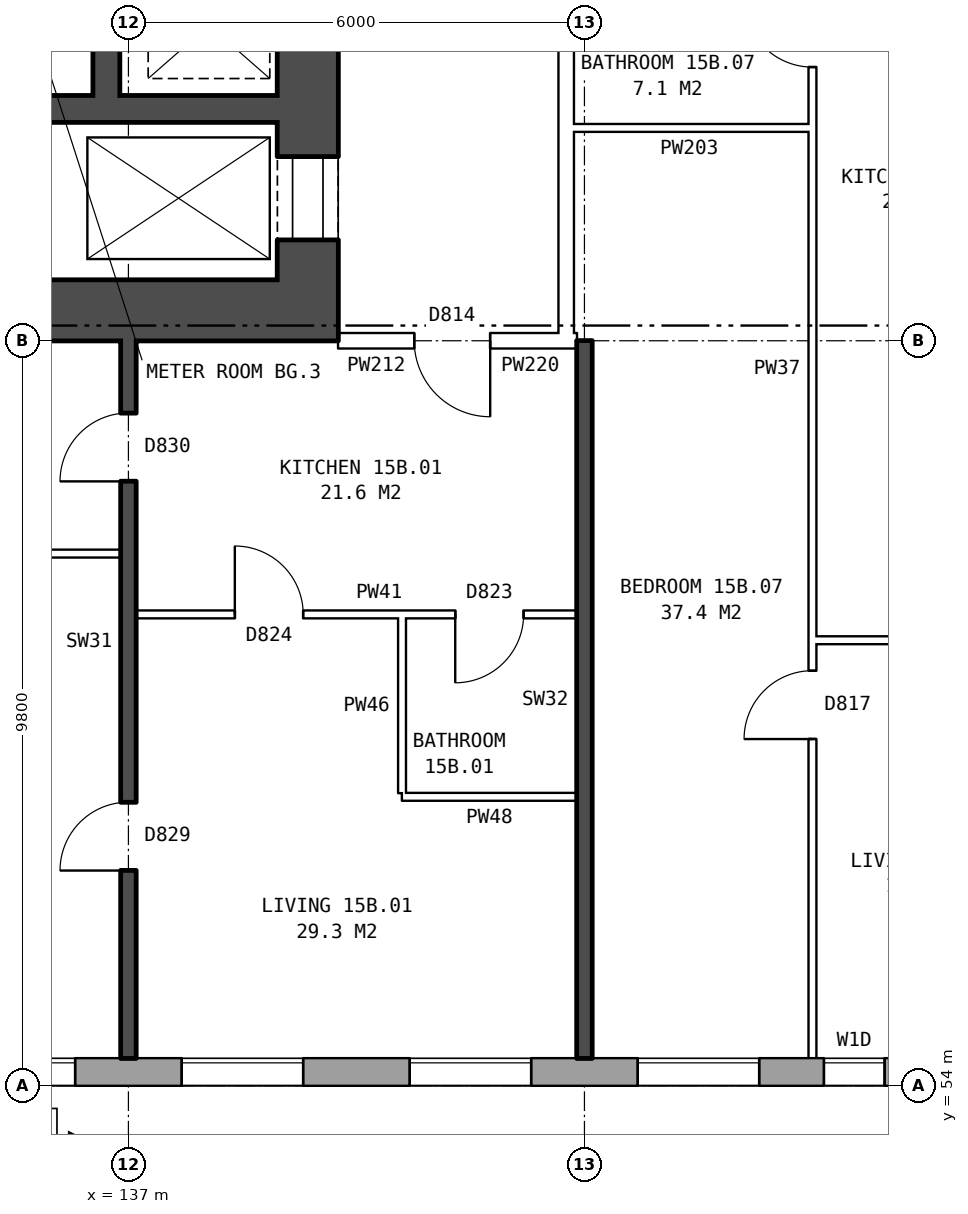
"""IFC4 building model, lengths in metres.
Left out: names, types, materials, properties, quantities, classifications, styles, units other than length and angle.
Written with IfcOpenShell. Run it as: python <this file> out.ifc"""

import sys

from ifc_helpers import new_model, si_unit, direction, frame, frame_2d, origin, place, context, subcontext, project, spatial, rectangle, extrude, element, fill, save


model = new_model("IFC4")
c1 = context("Model", 3, precision=1e-05, world=origin(), true_north=direction((0.0, 1.0)))
c2 = subcontext(c1, "Body", "Model", "MODEL_VIEW")
j1 = project(units=[si_unit("LENGTHUNIT", "METRE"), si_unit("PLANEANGLEUNIT", "RADIAN")], contexts=[c1])
p1 = place(None, origin())
s1 = spatial("IfcSite", under=j1, at=p1, CompositionType="ELEMENT")
p2 = place(p1, origin())
s2 = spatial("IfcBuilding", under=s1, at=p2, CompositionType="ELEMENT")
p3 = place(p2, frame((0.0, 0.0, 56.7)))
s3 = spatial("IfcBuildingStorey", under=s2, at=p3, CompositionType="ELEMENT", Elevation=56.7)
p4 = place(p3, frame((134.075, 54.18, 0.0), z_axis=(0.0, 0.0, 1.0), x_axis=(1.0, 0.0, 0.0)))
e1 = element("IfcWall", 1, at=p4, inside=s3, PredefinedType="STANDARD", context=c2, shape_type="SweptSolid", body=[
    extrude(rectangle(XDim=39.351, YDim=0.36, at=frame_2d((19.675, 0.0))), origin(), (0.0, 0.0, 1.0), 2.85),
])
p5 = place(p4, frame((0.625, 0.0, 0.8)))
e2 = element("IfcOpeningElement", 2, at=p5, cuts=e1, PredefinedType="OPENING", context=c2, shape_type="SweptSolid", body=[
    extrude(rectangle(XDim=1.6, YDim=1.8, at=frame_2d((0.8, 0.9))), frame((0.0, 0.19, 0.0), z_axis=(0.0, -1.0, 0.0), x_axis=(1.0, 0.0, 0.0)), (0.0, 0.0, 1.0), 0.38),
])
p6 = place(p4, frame((3.625, 0.0, 0.8)))
e3 = element("IfcOpeningElement", 3, at=p6, cuts=e1, PredefinedType="OPENING", context=c2, shape_type="SweptSolid", body=[
    extrude(rectangle(XDim=1.6, YDim=1.8, at=frame_2d((0.8, 0.9))), frame((0.0, 0.19, 0.0), z_axis=(0.0, -1.0, 0.0), x_axis=(1.0, 0.0, 0.0)), (0.0, 0.0, 1.0), 0.38),
])
p7 = place(p4, frame((6.625, 0.0, 0.8)))
e4 = element("IfcOpeningElement", 4, at=p7, cuts=e1, PredefinedType="OPENING", context=c2, shape_type="SweptSolid", body=[
    extrude(rectangle(XDim=1.6, YDim=1.8, at=frame_2d((0.8, 0.9))), frame((0.0, 0.19, 0.0), z_axis=(0.0, -1.0, 0.0), x_axis=(1.0, 0.0, 0.0)), (0.0, 0.0, 1.0), 0.38),
])
p8 = place(p4, frame((9.625, 0.0, 0.8)))
e5 = element("IfcOpeningElement", 5, at=p8, cuts=e1, PredefinedType="OPENING", context=c2, shape_type="SweptSolid", body=[
    extrude(rectangle(XDim=1.6, YDim=1.8, at=frame_2d((0.8, 0.9))), frame((0.0, 0.19, 0.0), z_axis=(0.0, -1.0, 0.0), x_axis=(1.0, 0.0, 0.0)), (0.0, 0.0, 1.0), 0.38),
])
p9 = place(p4, frame((12.075, 0.0, 0.8)))
e6 = element("IfcOpeningElement", 6, at=p9, cuts=e1, PredefinedType="OPENING", context=c2, shape_type="SweptSolid", body=[
    extrude(rectangle(XDim=0.8, YDim=1.8, at=frame_2d((0.4, 0.9))), frame((0.0, 0.19, 0.0), z_axis=(0.0, -1.0, 0.0), x_axis=(1.0, 0.0, 0.0)), (0.0, 0.0, 1.0), 0.38),
])
p10 = place(p4, frame((15.275, 0.0, 0.8)))
e7 = element("IfcOpeningElement", 7, at=p10, cuts=e1, PredefinedType="OPENING", context=c2, shape_type="SweptSolid", body=[
    extrude(rectangle(XDim=0.8, YDim=0.9, at=frame_2d((0.4, 0.45))), frame((0.0, 0.19, 0.0), z_axis=(0.0, -1.0, 0.0), x_axis=(1.0, 0.0, 0.0)), (0.0, 0.0, 1.0), 0.38),
])
p11 = place(p4, frame((18.625, 0.0, 0.8)))
e8 = element("IfcOpeningElement", 8, at=p11, cuts=e1, PredefinedType="OPENING", context=c2, shape_type="SweptSolid", body=[
    extrude(rectangle(XDim=1.6, YDim=1.8, at=frame_2d((0.8, 0.9))), frame((0.0, 0.19, 0.0), z_axis=(0.0, -1.0, 0.0), x_axis=(1.0, 0.0, 0.0)), (0.0, 0.0, 1.0), 0.38),
])
p12 = place(p4, frame((21.625, 0.0, 0.8)))
e9 = element("IfcOpeningElement", 9, at=p12, cuts=e1, PredefinedType="OPENING", context=c2, shape_type="SweptSolid", body=[
    extrude(rectangle(XDim=1.6, YDim=1.8, at=frame_2d((0.8, 0.9))), frame((0.0, 0.19, 0.0), z_axis=(0.0, -1.0, 0.0), x_axis=(1.0, 0.0, 0.0)), (0.0, 0.0, 1.0), 0.38),
])
p13 = place(p4, frame((25.275, 0.0, 1.7)))
e10 = element("IfcOpeningElement", 10, at=p13, cuts=e1, PredefinedType="OPENING", context=c2, shape_type="SweptSolid", body=[
    extrude(rectangle(XDim=1.4, YDim=0.9, at=frame_2d((0.7, 0.45))), frame((0.0, 0.19, 0.0), z_axis=(0.0, -1.0, 0.0), x_axis=(1.0, 0.0, 0.0)), (0.0, 0.0, 1.0), 0.38),
])
p14 = place(p4, frame((27.625, 0.0, 0.8)))
e11 = element("IfcOpeningElement", 11, at=p14, cuts=e1, PredefinedType="OPENING", context=c2, shape_type="SweptSolid", body=[
    extrude(rectangle(XDim=1.6, YDim=1.8, at=frame_2d((0.8, 0.9))), frame((0.0, 0.19, 0.0), z_axis=(0.0, -1.0, 0.0), x_axis=(1.0, 0.0, 0.0)), (0.0, 0.0, 1.0), 0.38),
])
p15 = place(p4, frame((30.625, 0.0, 0.8)))
e12 = element("IfcOpeningElement", 12, at=p15, cuts=e1, PredefinedType="OPENING", context=c2, shape_type="SweptSolid", body=[
    extrude(rectangle(XDim=1.6, YDim=1.8, at=frame_2d((0.8, 0.9))), frame((0.0, 0.19, 0.0), z_axis=(0.0, -1.0, 0.0), x_axis=(1.0, 0.0, 0.0)), (0.0, 0.0, 1.0), 0.38),
])
p16 = place(p4, frame((33.625, 0.0, 0.8)))
e13 = element("IfcOpeningElement", 13, at=p16, cuts=e1, PredefinedType="OPENING", context=c2, shape_type="SweptSolid", body=[
    extrude(rectangle(XDim=1.6, YDim=1.8, at=frame_2d((0.8, 0.9))), frame((0.0, 0.19, 0.0), z_axis=(0.0, -1.0, 0.0), x_axis=(1.0, 0.0, 0.0)), (0.0, 0.0, 1.0), 0.38),
])
p17 = place(p4, frame((36.625, 0.0, 0.8)))
e14 = element("IfcOpeningElement", 14, at=p17, cuts=e1, PredefinedType="OPENING", context=c2, shape_type="SweptSolid", body=[
    extrude(rectangle(XDim=1.6, YDim=1.8, at=frame_2d((0.8, 0.9))), frame((0.0, 0.19, 0.0), z_axis=(0.0, -1.0, 0.0), x_axis=(1.0, 0.0, 0.0)), (0.0, 0.0, 1.0), 0.38),
])
p18 = place(p4, frame((13.175, 0.0, 1.7)))
e15 = element("IfcOpeningElement", 15, at=p18, cuts=e1, PredefinedType="OPENING", context=c2, shape_type="SweptSolid", body=[
    extrude(rectangle(XDim=0.8, YDim=0.9, at=frame_2d((0.4, 0.45))), frame((0.0, 0.19, 0.0), z_axis=(0.0, -1.0, 0.0), x_axis=(1.0, 0.0, 0.0)), (0.0, 0.0, 1.0), 0.38),
])
p19 = place(p4, frame((16.375, 0.0, 0.8)))
e16 = element("IfcOpeningElement", 16, at=p19, cuts=e1, PredefinedType="OPENING", context=c2, shape_type="SweptSolid", body=[
    extrude(rectangle(XDim=1.4, YDim=1.8, at=frame_2d((0.7, 0.9))), frame((0.0, 0.19, 0.0), z_axis=(0.0, -1.0, 0.0), x_axis=(1.0, 0.0, 0.0)), (0.0, 0.0, 1.0), 0.38),
])
p20 = place(p3, frame((139.36, 64.6, 0.0), z_axis=(0.0, 0.0, 1.0), x_axis=(0.0, 1.0, 0.0)))
e17 = element("IfcWall", 17, at=p20, inside=s3, PredefinedType="SHEAR", context=c2, shape_type="SweptSolid", body=[
    extrude(rectangle(XDim=10.8, YDim=0.8, at=frame_2d((5.4, 0.0))), origin(), (0.0, 0.0, 1.0), 2.85),
])
p21 = place(p20, frame((0.525, 0.0, 0.0)))
e18 = element("IfcOpeningElement", 18, at=p21, cuts=e17, PredefinedType="OPENING", context=c2, shape_type="SweptSolid", body=[
    extrude(rectangle(XDim=1.1, YDim=2.1, at=frame_2d((0.55, 1.05))), frame((0.0, 0.41, 0.0), z_axis=(0.0, -1.0, 0.0), x_axis=(1.0, 0.0, 0.0)), (0.0, 0.0, 1.0), 0.82),
])
p22 = place(p20, frame((9.1, 0.0, 0.0)))
e19 = element("IfcOpeningElement", 19, at=p22, cuts=e17, PredefinedType="OPENING", context=c2, shape_type="SweptSolid", body=[
    extrude(rectangle(XDim=1.1, YDim=2.1, at=frame_2d((0.55, 1.05))), frame((0.0, 0.41, 0.0), z_axis=(0.0, -1.0, 0.0), x_axis=(1.0, 0.0, 0.0)), (0.0, 0.0, 1.0), 0.82),
])
p23 = place(p20, frame((7.325, 0.0, 0.0)))
e20 = element("IfcOpeningElement", 20, at=p23, cuts=e17, PredefinedType="OPENING", context=c2, shape_type="SweptSolid", body=[
    extrude(rectangle(XDim=0.85, YDim=2.1, at=frame_2d((0.425, 1.05))), frame((0.0, 0.41, 0.0), z_axis=(0.0, -1.0, 0.0), x_axis=(1.0, 0.0, 0.0)), (0.0, 0.0, 1.0), 0.82),
])
p24 = place(p3, frame((139.76, 64.2, 0.0), z_axis=(0.0, 0.0, 1.0), x_axis=(-1.0, 0.0, 0.0)))
e21 = element("IfcWall", 21, at=p24, inside=s3, PredefinedType="SHEAR", context=c2, shape_type="SweptSolid", body=[
    extrude(rectangle(XDim=8.4, YDim=0.8, at=frame_2d((4.2, 0.0))), origin(), (0.0, 0.0, 1.0), 2.85),
])
p25 = place(p3, frame((138.96, 66.85, 0.0), z_axis=(0.0, 0.0, 1.0), x_axis=(-1.0, 0.0, 0.0)))
e22 = element("IfcWall", 22, at=p25, inside=s3, PredefinedType="SHEAR", context=c2, shape_type="SweptSolid", body=[
    extrude(rectangle(XDim=3.925, YDim=0.35, at=frame_2d((1.962, 0.0))), origin(), (0.0, 0.0, 1.0), 2.85),
])
p26 = place(p3, frame((136.71, 67.025, 0.0), z_axis=(0.0, 0.0, 1.0), x_axis=(0.0, 1.0, 0.0)))
e23 = element("IfcWall", 23, at=p26, inside=s3, PredefinedType="SHEAR", context=c2, shape_type="SweptSolid", body=[
    extrude(rectangle(XDim=4.05, YDim=0.35, at=frame_2d((2.025, 0.0))), origin(), (0.0, 0.0, 1.0), 2.85),
])
p27 = place(p3, frame((142.76, 63.9, 0.0), z_axis=(0.0, 0.0, 1.0), x_axis=(0.0, 1.0, 0.0)))
e24 = element("IfcWall", 24, at=p27, inside=s3, PredefinedType="PARTITIONING", context=c2, shape_type="SweptSolid", body=[
    extrude(rectangle(XDim=12.2, YDim=0.2, at=frame_2d((6.1, 0.0))), origin(), (0.0, 0.0, 1.0), 2.85),
])
p28 = place(p27, frame((5.1, 0.0, 0.0)))
e25 = element("IfcOpeningElement", 25, at=p28, cuts=e24, PredefinedType="OPENING", context=c2, shape_type="SweptSolid", body=[
    extrude(rectangle(XDim=2.0, YDim=2.1, at=frame_2d((1.0, 1.05))), frame((0.0, 0.11, 0.0), z_axis=(0.0, -1.0, 0.0), x_axis=(1.0, 0.0, 0.0)), (0.0, 0.0, 1.0), 0.22),
])
p29 = place(p3, frame((140.6, 57.8, 0.0), z_axis=(0.0, 0.0, 1.0), x_axis=(1.0, 0.0, 0.0)))
e26 = element("IfcWall", 26, at=p29, inside=s3, PredefinedType="PARTITIONING", context=c2, shape_type="SweptSolid", body=[
    extrude(rectangle(XDim=2.3, YDim=0.1, at=frame_2d((1.15, 0.0))), origin(), (0.0, 0.0, 1.0), 2.85),
])
p30 = place(p3, frame((146.0, 59.86, 0.0), z_axis=(0.0, 0.0, 1.0), x_axis=(1.0, 0.0, 0.0)))
e27 = element("IfcWall", 27, at=p30, inside=s3, PredefinedType="PARTITIONING", context=c2, shape_type="SweptSolid", body=[
    extrude(rectangle(XDim=6.0, YDim=0.1, at=frame_2d((3.0, 0.0))), origin(), (0.0, 0.0, 1.0), 2.85),
])
p31 = place(p30, frame((1.05, 0.0, 0.0)))
e28 = element("IfcOpeningElement", 28, at=p31, cuts=e27, PredefinedType="OPENING", context=c2, shape_type="SweptSolid", body=[
    extrude(rectangle(XDim=0.9, YDim=2.1, at=frame_2d((0.45, 1.05))), frame((0.0, 0.06, 0.0), z_axis=(0.0, -1.0, 0.0), x_axis=(1.0, 0.0, 0.0)), (0.0, 0.0, 1.0), 0.12),
])
p32 = place(p30, frame((4.05, 0.0, 0.0)))
e29 = element("IfcOpeningElement", 29, at=p32, cuts=e27, PredefinedType="OPENING", context=c2, shape_type="SweptSolid", body=[
    extrude(rectangle(XDim=0.9, YDim=2.1, at=frame_2d((0.45, 1.05))), frame((0.0, 0.06, 0.0), z_axis=(0.0, -1.0, 0.0), x_axis=(1.0, 0.0, 0.0)), (0.0, 0.0, 1.0), 0.12),
])
p33 = place(p3, frame((137.1, 60.2, 0.0), z_axis=(0.0, 0.0, 1.0), x_axis=(1.0, 0.0, 0.0)))
e30 = element("IfcWall", 30, at=p33, inside=s3, PredefinedType="PARTITIONING", context=c2, shape_type="SweptSolid", body=[
    extrude(rectangle(XDim=5.8, YDim=0.1, at=frame_2d((2.9, 0.0))), origin(), (0.0, 0.0, 1.0), 2.85),
])
p34 = place(p33, frame((1.3, 0.0, 0.0)))
e31 = element("IfcOpeningElement", 31, at=p34, cuts=e30, PredefinedType="OPENING", context=c2, shape_type="SweptSolid", body=[
    extrude(rectangle(XDim=0.9, YDim=2.1, at=frame_2d((0.45, 1.05))), frame((0.0, 0.06, 0.0), z_axis=(0.0, -1.0, 0.0), x_axis=(1.0, 0.0, 0.0)), (0.0, 0.0, 1.0), 0.12),
])
p35 = place(p33, frame((4.2, 0.0, 0.0)))
e32 = element("IfcOpeningElement", 32, at=p35, cuts=e30, PredefinedType="OPENING", context=c2, shape_type="SweptSolid", body=[
    extrude(rectangle(XDim=0.9, YDim=2.1, at=frame_2d((0.45, 1.05))), frame((0.0, 0.06, 0.0), z_axis=(0.0, -1.0, 0.0), x_axis=(1.0, 0.0, 0.0)), (0.0, 0.0, 1.0), 0.12),
])
p36 = place(p3, frame((131.36, 61.0, 0.0), z_axis=(0.0, 0.0, 1.0), x_axis=(1.0, 0.0, 0.0)))
e33 = element("IfcWall", 33, at=p36, inside=s3, PredefinedType="PARTITIONING", context=c2, shape_type="SweptSolid", body=[
    extrude(rectangle(XDim=5.54, YDim=0.1, at=frame_2d((2.77, 0.0))), origin(), (0.0, 0.0, 1.0), 2.85),
])
p37 = place(p3, frame((139.76, 63.8, 0.0), z_axis=(0.0, 0.0, 1.0), x_axis=(1.0, 0.0, 0.0)))
e34 = element("IfcWall", 34, at=p37, inside=s3, PredefinedType="PARTITIONING", context=c2, shape_type="SweptSolid", body=[
    extrude(rectangle(XDim=3.0, YDim=0.2, at=frame_2d((1.5, 0.0))), origin(), (0.0, 0.0, 1.0), 2.85),
])
p38 = place(p37, frame((1.0, 0.0, 0.0)))
e35 = element("IfcOpeningElement", 35, at=p38, cuts=e34, PredefinedType="OPENING", context=c2, shape_type="SweptSolid", body=[
    extrude(rectangle(XDim=1.0, YDim=2.1, at=frame_2d((0.5, 1.05))), frame((0.0, 0.11, 0.0), z_axis=(0.0, -1.0, 0.0), x_axis=(1.0, 0.0, 0.0)), (0.0, 0.0, 1.0), 0.22),
])
p39 = place(p3, frame((142.76, 63.8, 0.0), z_axis=(0.0, 0.0, 1.0), x_axis=(1.0, 0.0, 0.0)))
e36 = element("IfcWall", 36, at=p39, inside=s3, PredefinedType="PARTITIONING", context=c2, shape_type="SweptSolid", body=[
    extrude(rectangle(XDim=0.14, YDim=0.2, at=frame_2d((0.07, 0.0))), origin(), (0.0, 0.0, 1.0), 2.85),
])
p40 = place(p3, frame((142.76, 66.6, 0.0), z_axis=(0.0, 0.0, 1.0), x_axis=(1.0, 0.0, 0.0)))
e37 = element("IfcWall", 37, at=p40, inside=s3, PredefinedType="PARTITIONING", context=c2, shape_type="SweptSolid", body=[
    extrude(rectangle(XDim=3.24, YDim=0.1, at=frame_2d((1.62, 0.0))), origin(), (0.0, 0.0, 1.0), 2.85),
])
p41 = place(p3, frame((137.0, 54.36, 0.0), z_axis=(0.0, 0.0, 1.0), x_axis=(0.0, 1.0, 0.0)))
e38 = element("IfcWall", 38, at=p41, inside=s3, PredefinedType="SOLIDWALL", context=c2, shape_type="SweptSolid", body=[
    extrude(rectangle(XDim=9.44, YDim=0.2, at=frame_2d((4.72, 0.0))), origin(), (0.0, 0.0, 1.0), 2.85),
])
p42 = place(p41, frame((2.47, 0.0, 0.0)))
e39 = element("IfcOpeningElement", 39, at=p42, cuts=e38, PredefinedType="OPENING", context=c2, shape_type="SweptSolid", body=[
    extrude(rectangle(XDim=0.9, YDim=2.1, at=frame_2d((0.45, 1.05))), frame((0.0, 0.11, 0.0), z_axis=(0.0, -1.0, 0.0), x_axis=(1.0, 0.0, 0.0)), (0.0, 0.0, 1.0), 0.22),
])
p43 = place(p41, frame((7.59, 0.0, 0.0)))
e40 = element("IfcOpeningElement", 40, at=p43, cuts=e38, PredefinedType="OPENING", context=c2, shape_type="SweptSolid", body=[
    extrude(rectangle(XDim=0.9, YDim=2.1, at=frame_2d((0.45, 1.05))), frame((0.0, 0.11, 0.0), z_axis=(0.0, -1.0, 0.0), x_axis=(1.0, 0.0, 0.0)), (0.0, 0.0, 1.0), 0.22),
])
p44 = place(p3, frame((140.6, 57.85, 0.0), z_axis=(0.0, 0.0, 1.0), x_axis=(0.0, 1.0, 0.0)))
e41 = element("IfcWall", 41, at=p44, inside=s3, PredefinedType="PARTITIONING", context=c2, shape_type="SweptSolid", body=[
    extrude(rectangle(XDim=2.3, YDim=0.1, at=frame_2d((1.15, 0.0))), origin(), (0.0, 0.0, 1.0), 2.85),
])
p45 = place(p3, frame((143.0, 54.36, 0.0), z_axis=(0.0, 0.0, 1.0), x_axis=(0.0, 1.0, 0.0)))
e42 = element("IfcWall", 42, at=p45, inside=s3, PredefinedType="SOLIDWALL", context=c2, shape_type="SweptSolid", body=[
    extrude(rectangle(XDim=9.44, YDim=0.2, at=frame_2d((4.72, 0.0))), origin(), (0.0, 0.0, 1.0), 2.85),
])
p46 = place(p3, frame((146.0, 54.36, 0.0), z_axis=(0.0, 0.0, 1.0), x_axis=(0.0, 1.0, 0.0)))
e43 = element("IfcWall", 43, at=p46, inside=s3, PredefinedType="PARTITIONING", context=c2, shape_type="SweptSolid", body=[
    extrude(rectangle(XDim=14.34, YDim=0.1, at=frame_2d((7.17, 0.0))), origin(), (0.0, 0.0, 1.0), 2.85),
])
p47 = place(p46, frame((4.2, 0.0, 0.0)))
e44 = element("IfcOpeningElement", 44, at=p47, cuts=e43, PredefinedType="OPENING", context=c2, shape_type="SweptSolid", body=[
    extrude(rectangle(XDim=0.9, YDim=2.1, at=frame_2d((0.45, 1.05))), frame((0.0, 0.06, 0.0), z_axis=(0.0, -1.0, 0.0), x_axis=(1.0, 0.0, 0.0)), (0.0, 0.0, 1.0), 0.12),
])
p48 = place(p46, frame((13.04, 0.0, 0.0)))
e45 = element("IfcOpeningElement", 45, at=p48, cuts=e43, PredefinedType="OPENING", context=c2, shape_type="SweptSolid", body=[
    extrude(rectangle(XDim=0.9, YDim=2.1, at=frame_2d((0.45, 1.05))), frame((0.0, 0.06, 0.0), z_axis=(0.0, -1.0, 0.0), x_axis=(1.0, 0.0, 0.0)), (0.0, 0.0, 1.0), 0.12),
])
p49 = place(p5, origin())
e46 = element("IfcWindow", 46, at=p49, inside=s3, PartitioningType="SINGLE_PANEL", PredefinedType="WINDOW", context=c2, shape_type="SweptSolid", body=[
    extrude(rectangle(XDim=1.6, YDim=1.8, at=frame_2d((0.8, 0.9))), frame((0.0, 0.15, 0.0), z_axis=(0.0, -1.0, 0.0), x_axis=(1.0, 0.0, 0.0)), (0.0, 0.0, 1.0), 0.06),
])
fill(e2, e46)
p50 = place(p6, origin())
e47 = element("IfcWindow", 47, at=p50, inside=s3, PartitioningType="SINGLE_PANEL", PredefinedType="WINDOW", context=c2, shape_type="SweptSolid", body=[
    extrude(rectangle(XDim=1.6, YDim=1.8, at=frame_2d((0.8, 0.9))), frame((0.0, 0.15, 0.0), z_axis=(0.0, -1.0, 0.0), x_axis=(1.0, 0.0, 0.0)), (0.0, 0.0, 1.0), 0.06),
])
fill(e3, e47)
p51 = place(p7, origin())
e48 = element("IfcWindow", 48, at=p51, inside=s3, PartitioningType="SINGLE_PANEL", PredefinedType="WINDOW", context=c2, shape_type="SweptSolid", body=[
    extrude(rectangle(XDim=1.6, YDim=1.8, at=frame_2d((0.8, 0.9))), frame((0.0, 0.15, 0.0), z_axis=(0.0, -1.0, 0.0), x_axis=(1.0, 0.0, 0.0)), (0.0, 0.0, 1.0), 0.06),
])
fill(e4, e48)
p52 = place(p8, origin())
e49 = element("IfcWindow", 49, at=p52, inside=s3, PartitioningType="SINGLE_PANEL", PredefinedType="WINDOW", context=c2, shape_type="SweptSolid", body=[
    extrude(rectangle(XDim=1.6, YDim=1.8, at=frame_2d((0.8, 0.9))), frame((0.0, 0.15, 0.0), z_axis=(0.0, -1.0, 0.0), x_axis=(1.0, 0.0, 0.0)), (0.0, 0.0, 1.0), 0.06),
])
fill(e5, e49)
p53 = place(p9, origin())
e50 = element("IfcWindow", 50, at=p53, inside=s3, PartitioningType="SINGLE_PANEL", PredefinedType="WINDOW", context=c2, shape_type="SweptSolid", body=[
    extrude(rectangle(XDim=0.8, YDim=1.8, at=frame_2d((0.4, 0.9))), frame((0.0, 0.15, 0.0), z_axis=(0.0, -1.0, 0.0), x_axis=(1.0, 0.0, 0.0)), (0.0, 0.0, 1.0), 0.06),
])
fill(e6, e50)
p54 = place(p21, origin())
e51 = element("IfcDoor", 51, at=p54, inside=s3, OperationType="DOUBLE_DOOR_SLIDING", PredefinedType="DOOR", context=c2, shape_type="SweptSolid", body=[
    extrude(rectangle(XDim=1.1, YDim=2.1, at=frame_2d((0.55, 1.05))), frame((0.0, 0.385, 0.0), z_axis=(0.0, -1.0, 0.0), x_axis=(1.0, 0.0, 0.0)), (0.0, 0.0, 1.0), 0.05),
])
fill(e18, e51)
p55 = place(p42, origin())
e52 = element("IfcDoor", 52, at=p55, inside=s3, OperationType="SINGLE_SWING_LEFT", PredefinedType="DOOR", context=c2, shape_type="SweptSolid", body=[
    extrude(rectangle(XDim=0.9, YDim=2.1, at=frame_2d((0.45, 1.05))), frame((0.0, 0.025, 0.0), z_axis=(0.0, -1.0, 0.0), x_axis=(1.0, 0.0, 0.0)), (0.0, 0.0, 1.0), 0.05),
])
fill(e39, e52)
p56 = place(p43, origin())
e53 = element("IfcDoor", 53, at=p56, inside=s3, OperationType="SINGLE_SWING_LEFT", PredefinedType="DOOR", context=c2, shape_type="SweptSolid", body=[
    extrude(rectangle(XDim=0.9, YDim=2.1, at=frame_2d((0.45, 1.05))), frame((0.0, 0.025, 0.0), z_axis=(0.0, -1.0, 0.0), x_axis=(1.0, 0.0, 0.0)), (0.0, 0.0, 1.0), 0.05),
])
fill(e40, e53)
p57 = place(p38, frame((1.0, 0.0, 0.0), z_axis=(0.0, 0.0, 1.0), x_axis=(-1.0, 0.0, 0.0)))
e54 = element("IfcDoor", 54, at=p57, inside=s3, OperationType="SINGLE_SWING_LEFT", PredefinedType="DOOR", context=c2, shape_type="SweptSolid", body=[
    extrude(rectangle(XDim=1.0, YDim=2.1, at=frame_2d((0.5, 1.05))), frame((0.0, 0.025, 0.0), z_axis=(0.0, -1.0, 0.0), x_axis=(1.0, 0.0, 0.0)), (0.0, 0.0, 1.0), 0.05),
])
fill(e35, e54)
p58 = place(p34, origin())
e55 = element("IfcDoor", 55, at=p58, inside=s3, OperationType="SINGLE_SWING_LEFT", PredefinedType="DOOR", context=c2, shape_type="SweptSolid", body=[
    extrude(rectangle(XDim=0.9, YDim=2.1, at=frame_2d((0.45, 1.05))), frame((0.0, 0.025, 0.0), z_axis=(0.0, -1.0, 0.0), x_axis=(1.0, 0.0, 0.0)), (0.0, 0.0, 1.0), 0.05),
])
fill(e31, e55)
p59 = place(p35, frame((0.9, 0.0, 0.0), z_axis=(0.0, 0.0, 1.0), x_axis=(-1.0, 0.0, 0.0)))
e56 = element("IfcDoor", 56, at=p59, inside=s3, OperationType="SINGLE_SWING_RIGHT", PredefinedType="DOOR", context=c2, shape_type="SweptSolid", body=[
    extrude(rectangle(XDim=0.9, YDim=2.1, at=frame_2d((0.45, 1.05))), frame((0.0, 0.025, 0.0), z_axis=(0.0, -1.0, 0.0), x_axis=(1.0, 0.0, 0.0)), (0.0, 0.0, 1.0), 0.05),
])
fill(e32, e56)
p60 = place(p47, origin())
e57 = element("IfcDoor", 57, at=p60, inside=s3, OperationType="SINGLE_SWING_LEFT", PredefinedType="DOOR", context=c2, shape_type="SweptSolid", body=[
    extrude(rectangle(XDim=0.9, YDim=2.1, at=frame_2d((0.45, 1.05))), frame((0.0, 0.025, 0.0), z_axis=(0.0, -1.0, 0.0), x_axis=(1.0, 0.0, 0.0)), (0.0, 0.0, 1.0), 0.05),
])
fill(e44, e57)
p61 = place(p48, origin())
e58 = element("IfcDoor", 58, at=p61, inside=s3, OperationType="SINGLE_SWING_RIGHT", PredefinedType="DOOR", context=c2, shape_type="SweptSolid", body=[
    extrude(rectangle(XDim=0.9, YDim=2.1, at=frame_2d((0.45, 1.05))), frame((0.0, 0.025, 0.0), z_axis=(0.0, -1.0, 0.0), x_axis=(1.0, 0.0, 0.0)), (0.0, 0.0, 1.0), 0.05),
])
fill(e45, e58)
save(model, sys.argv[1])
